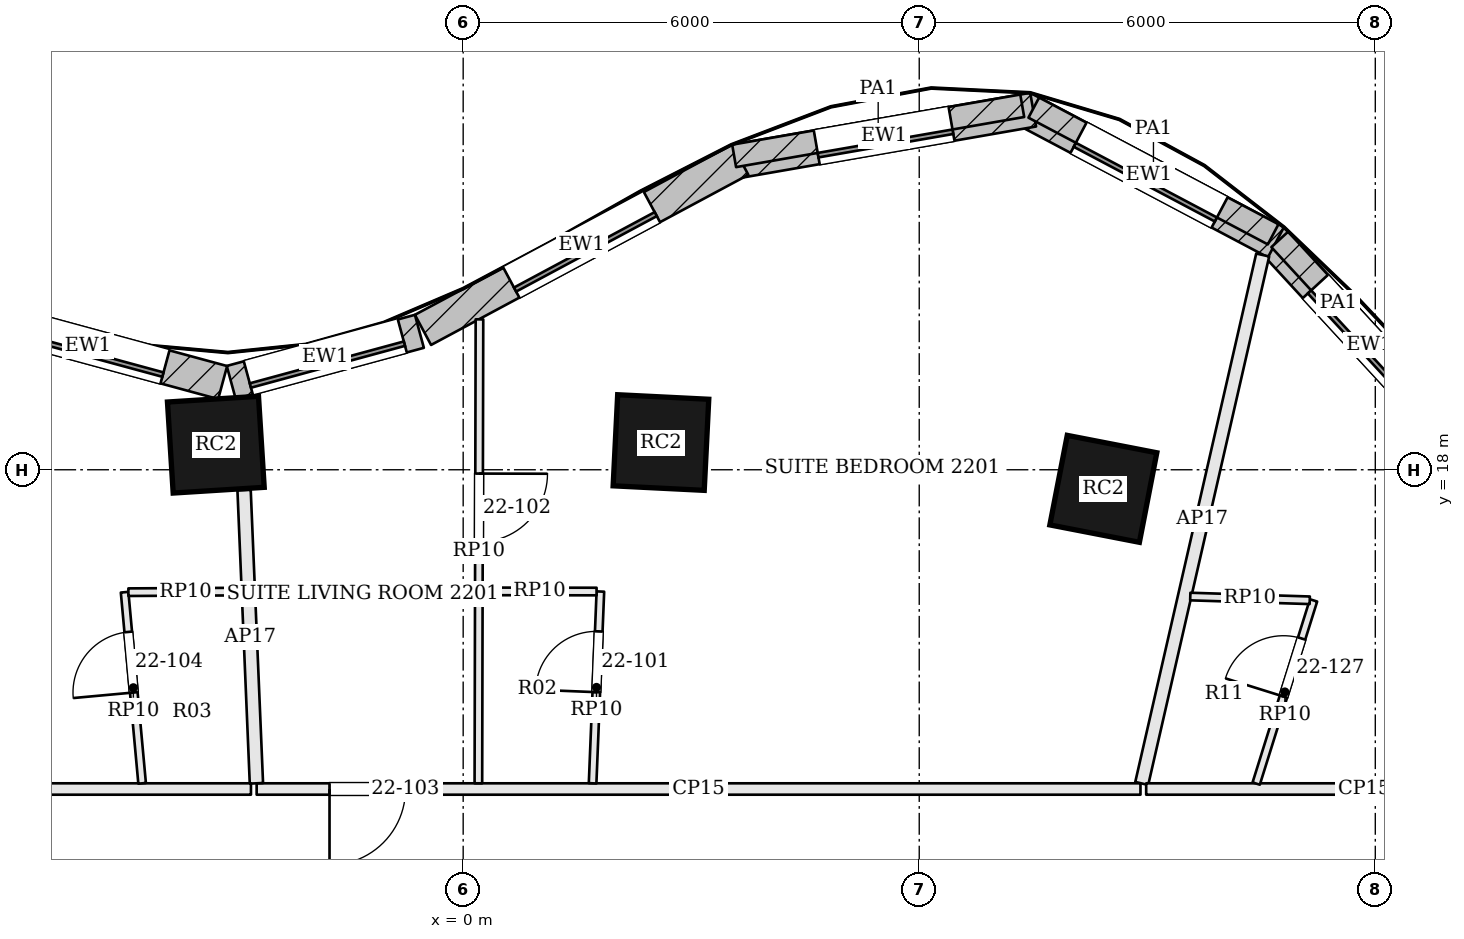
"""IFC4 building model, lengths in metres.
Left out: names, types, materials, properties, quantities, classifications, styles, units other than length and angle.
Written with IfcOpenShell. Run it as: python <this file> out.ifc"""

import sys

from ifc_helpers import new_model, si_unit, direction, frame, frame_2d, origin, origin_2d, place, context, subcontext, project, spatial, rectangle, extrude, element, fill, save


model = new_model("IFC4")
c1 = context("Model", 3, precision=1e-05, world=origin(), true_north=direction((0.0, 1.0)))
c2 = subcontext(c1, "Body", "Model", "MODEL_VIEW")
j1 = project(units=[si_unit("LENGTHUNIT", "METRE"), si_unit("PLANEANGLEUNIT", "RADIAN")], contexts=[c1])
p1 = place(None, origin())
s1 = spatial("IfcSite", under=j1, at=p1, CompositionType="ELEMENT")
p2 = place(p1, origin())
s2 = spatial("IfcBuilding", under=s1, at=p2, CompositionType="ELEMENT")
p3 = place(p2, frame((0.0, 0.0, 96.0)))
s3 = spatial("IfcBuildingStorey", under=s2, at=p3, CompositionType="ELEMENT", Elevation=96.0)
for number, where, z_axis, x_axis in (
    (1, (8.422, 17.749, 0.0), (0.0, 0.0, 1.0), (-0.982, 0.191, 0.0)),
    (2, (2.602, 18.358, 0.0), (0.0, 0.0, 1.0), (-0.999, 0.05, 0.0)),
    (3, (-3.254, 18.33, 0.0), (0.0, 0.0, 1.0), (-0.998, -0.063, 0.0)),
):
    element("IfcColumn", number, at=place(p3, frame(where, z_axis=z_axis, x_axis=x_axis)), inside=s3, PredefinedType="COLUMN", context=c2, shape_type="SweptSolid", body=[
        extrude(rectangle(XDim=1.2, YDim=1.2, at=origin_2d()), origin(), (0.0, 0.0, 1.0), 3.6),
    ])
p4 = place(p3, frame((13.209, 18.243, 0.0), z_axis=(0.0, 0.0, 1.0), x_axis=(-0.677612152497, 0.735419452278, 0.0)))
e4 = element("IfcWall", 4, at=p4, inside=s3, PredefinedType="SOLIDWALL", context=c2, shape_type="SweptSolid", body=[
    extrude(rectangle(XDim=3.797, YDim=0.45, at=frame_2d((1.898, 0.0))), origin(), (0.0, 0.0, 1.0), 3.4),
])
p5 = place(p4, frame((0.848, 0.0, 0.9)))
e5 = element("IfcOpeningElement", 5, at=p5, cuts=e4, PredefinedType="OPENING", context=c2, shape_type="SweptSolid", body=[
    extrude(rectangle(XDim=2.1, YDim=2.0, at=frame_2d((1.05, 1.0))), frame((0.0, 0.235, 0.0), z_axis=(0.0, -1.0, 0.0), x_axis=(1.0, 0.0, 0.0)), (0.0, 0.0, 1.0), 0.47),
])
p6 = place(p3, frame((10.693, 20.993, 0.0), z_axis=(0.0, 0.0, 1.0), x_axis=(-0.883817790726, 0.46783128668, 0.0)))
e6 = element("IfcWall", 6, at=p6, inside=s3, PredefinedType="SOLIDWALL", context=c2, shape_type="SweptSolid", body=[
    extrude(rectangle(XDim=3.777, YDim=0.45, at=frame_2d((1.888, 0.0))), origin(), (0.0, 0.0, 1.0), 3.4),
])
p7 = place(p6, frame((0.838, 0.0, 0.9)))
e7 = element("IfcOpeningElement", 7, at=p7, cuts=e6, PredefinedType="OPENING", context=c2, shape_type="SweptSolid", body=[
    extrude(rectangle(XDim=2.1, YDim=2.0, at=frame_2d((1.05, 1.0))), frame((0.0, 0.235, 0.0), z_axis=(0.0, -1.0, 0.0), x_axis=(1.0, 0.0, 0.0)), (0.0, 0.0, 1.0), 0.47),
])
p8 = place(p3, frame((7.499, 22.737, 0.0), z_axis=(0.0, 0.0, 1.0), x_axis=(-0.98521220506, -0.171338585849, 0.0)))
e8 = element("IfcWall", 8, at=p8, inside=s3, PredefinedType="SOLIDWALL", context=c2, shape_type="SweptSolid", body=[
    extrude(rectangle(XDim=3.98, YDim=0.45, at=frame_2d((1.99, 0.0))), origin(), (0.0, 0.0, 1.0), 3.4),
])
p9 = place(p8, frame((1.09, 0.0, 0.9)))
e9 = element("IfcOpeningElement", 9, at=p9, cuts=e8, PredefinedType="OPENING", context=c2, shape_type="SweptSolid", body=[
    extrude(rectangle(XDim=1.8, YDim=2.0, at=frame_2d((0.9, 1.0))), frame((0.0, 0.235, 0.0), z_axis=(0.0, -1.0, 0.0), x_axis=(1.0, 0.0, 0.0)), (0.0, 0.0, 1.0), 0.47),
])
p10 = place(p3, frame((3.646, 22.079, 0.0), z_axis=(0.0, 0.0, 1.0), x_axis=(-0.881279133897, -0.472596115259, 0.0)))
e10 = element("IfcWall", 10, at=p10, inside=s3, PredefinedType="SOLIDWALL", context=c2, shape_type="SweptSolid", body=[
    extrude(rectangle(XDim=4.737, YDim=0.45, at=frame_2d((2.368, 0.0))), origin(), (0.0, 0.0, 1.0), 3.4),
])
p11 = place(p10, frame((1.318, 0.0, 0.9)))
e11 = element("IfcOpeningElement", 11, at=p11, cuts=e10, PredefinedType="OPENING", context=c2, shape_type="SweptSolid", body=[
    extrude(rectangle(XDim=2.1, YDim=2.0, at=frame_2d((1.05, 1.0))), frame((0.0, 0.235, 0.0), z_axis=(0.0, -1.0, 0.0), x_axis=(1.0, 0.0, 0.0)), (0.0, 0.0, 1.0), 0.47),
])
p12 = place(p3, frame((-0.576, 19.821, 0.0), z_axis=(0.0, 0.0, 1.0), x_axis=(-0.965009398019, -0.262215296532, 0.0)))
e12 = element("IfcWall", 12, at=p12, inside=s3, PredefinedType="SOLIDWALL", context=c2, shape_type="SweptSolid", body=[
    extrude(rectangle(XDim=2.565, YDim=0.45, at=frame_2d((1.283, 0.0))), origin(), (0.0, 0.0, 1.0), 3.4),
])
p13 = place(p12, frame((0.233, 0.0, 0.9)))
e13 = element("IfcOpeningElement", 13, at=p13, cuts=e12, PredefinedType="OPENING", context=c2, shape_type="SweptSolid", body=[
    extrude(rectangle(XDim=2.1, YDim=2.0, at=frame_2d((1.05, 1.0))), frame((0.0, 0.235, 0.0), z_axis=(0.0, -1.0, 0.0), x_axis=(1.0, 0.0, 0.0)), (0.0, 0.0, 1.0), 0.47),
])
p14 = place(p3, frame((-3.164, 19.147, 0.0), z_axis=(0.0, 0.0, 1.0), x_axis=(-0.965039479998, 0.262104563191, 0.0)))
e14 = element("IfcWall", 14, at=p14, inside=s3, PredefinedType="SOLIDWALL", context=c2, shape_type="SweptSolid", body=[
    extrude(rectangle(XDim=3.672, YDim=0.45, at=frame_2d((1.836, 0.0))), origin(), (0.0, 0.0, 1.0), 3.4),
])
p15 = place(p14, frame((0.786, 0.0, 0.9)))
e15 = element("IfcOpeningElement", 15, at=p15, cuts=e14, PredefinedType="OPENING", context=c2, shape_type="SweptSolid", body=[
    extrude(rectangle(XDim=2.1, YDim=2.0, at=frame_2d((1.05, 1.0))), frame((0.0, 0.235, 0.0), z_axis=(0.0, -1.0, 0.0), x_axis=(1.0, 0.0, 0.0)), (0.0, 0.0, 1.0), 0.47),
])
p16 = place(p3, frame((12.288, 19.354, 3.6), z_axis=(0.0, 0.0, 1.0), x_axis=(-0.677603807485, 0.735427141246, 0.0)))
e16 = element("IfcWall", 16, at=p16, inside=s3, PredefinedType="PARAPET", context=c2, shape_type="SweptSolid", body=[
    extrude(rectangle(XDim=2.28, YDim=0.3, at=frame_2d((1.14, 0.0))), origin(), (0.0, 0.0, 1.0), 1.1),
])
p17 = place(p3, frame((10.656, 21.097, 3.6), z_axis=(0.0, 0.0, 1.0), x_axis=(-0.883797916666, 0.467868830439, 0.0)))
e17 = element("IfcWall", 17, at=p17, inside=s3, PredefinedType="PARAPET", context=c2, shape_type="SweptSolid", body=[
    extrude(rectangle(XDim=3.563, YDim=0.3, at=frame_2d((1.781, 0.0))), origin(), (0.0, 0.0, 1.0), 1.1),
])
p18 = place(p3, frame((7.355, 22.789, 3.6), z_axis=(0.0, 0.0, 1.0), x_axis=(-0.985201040548, -0.171402770404, 0.0)))
e18 = element("IfcWall", 18, at=p18, inside=s3, PredefinedType="PARAPET", context=c2, shape_type="SweptSolid", body=[
    extrude(rectangle(XDim=3.847, YDim=0.3, at=frame_2d((1.924, 0.0))), origin(), (0.0, 0.0, 1.0), 1.1),
])
p19 = place(p3, frame((8.911, 13.8, 0.0), z_axis=(0.0, 0.0, 1.0), x_axis=(-1.0, 0.0, 0.0)))
e19 = element("IfcWall", 19, at=p19, inside=s3, PredefinedType="PARTITIONING", context=c2, shape_type="SweptSolid", body=[
    extrude(rectangle(XDim=11.628, YDim=0.15, at=frame_2d((5.814, 0.0))), origin(), (0.0, 0.0, 1.0), 2.784),
])
p20 = place(p19, frame((9.669, 0.0, 0.0)))
e20 = element("IfcOpeningElement", 20, at=p20, cuts=e19, PredefinedType="OPENING", context=c2, shape_type="SweptSolid", body=[
    extrude(rectangle(XDim=1.0, YDim=2.1, at=frame_2d((0.5, 1.05))), frame((0.0, 0.085, 0.0), z_axis=(0.0, -1.0, 0.0), x_axis=(1.0, 0.0, 0.0)), (0.0, 0.0, 1.0), 0.17),
])
p21 = place(p3, frame((10.519, 20.825, 0.0), z_axis=(0.0, 0.0, 1.0), x_axis=(-0.223124088509, -0.974790049768, 0.0)))
e21 = element("IfcWall", 21, at=p21, inside=s3, PredefinedType="PARTITIONING", context=c2, shape_type="SweptSolid", body=[
    extrude(rectangle(XDim=7.132, YDim=0.175, at=frame_2d((3.566, 0.0))), origin(), (0.0, 0.0, 1.0), 2.784),
])
p22 = place(p3, frame((-2.882, 17.732, 0.0), z_axis=(0.0, 0.0, 1.0), x_axis=(0.04199090748, -0.999117992876, 0.0)))
e22 = element("IfcWall", 22, at=p22, inside=s3, PredefinedType="PARTITIONING", context=c2, shape_type="SweptSolid", body=[
    extrude(rectangle(XDim=3.861, YDim=0.175, at=frame_2d((1.93, 0.0))), origin(), (0.0, 0.0, 1.0), 2.784),
])
p23 = place(p3, frame((-2.792, 13.8, 0.0), z_axis=(0.0, 0.0, 1.0), x_axis=(-1.0, 0.0, 0.0)))
e23 = element("IfcWall", 23, at=p23, inside=s3, PredefinedType="PARTITIONING", context=c2, shape_type="SweptSolid", body=[
    extrude(rectangle(XDim=12.008, YDim=0.15, at=frame_2d((6.004, 0.0))), origin(), (0.0, 0.0, 1.0), 2.784),
])
p24 = place(p23, frame((6.771, 0.0, 0.0)))
e24 = element("IfcOpeningElement", 24, at=p24, cuts=e23, PredefinedType="OPENING", context=c2, shape_type="SweptSolid", body=[
    extrude(rectangle(XDim=0.9, YDim=2.4, at=frame_2d((0.45, 1.2))), frame((0.0, 0.085, 0.0), z_axis=(0.0, -1.0, 0.0), x_axis=(1.0, 0.0, 0.0)), (0.0, 0.0, 1.0), 0.17),
])
p25 = place(p3, frame((14.725, 13.8, 0.0), z_axis=(0.0, 0.0, 1.0), x_axis=(-1.0, 0.0, 0.0)))
e25 = element("IfcWall", 25, at=p25, inside=s3, PredefinedType="PARTITIONING", context=c2, shape_type="SweptSolid", body=[
    extrude(rectangle(XDim=5.74, YDim=0.15, at=frame_2d((2.87, 0.0))), origin(), (0.0, 0.0, 1.0), 2.784),
])
p26 = place(p3, frame((0.214, 19.979, 0.0), z_axis=(0.0, 0.0, 1.0), x_axis=(-0.002359899032, -0.999997215434, 0.0)))
e26 = element("IfcWall", 26, at=p26, inside=s3, PredefinedType="PARTITIONING", context=c2, shape_type="SweptSolid", body=[
    extrude(rectangle(XDim=6.104, YDim=0.1, at=frame_2d((3.052, 0.0))), origin(), (0.0, 0.0, 1.0), 2.884),
])
p27 = place(p26, frame((2.029, 0.0, 0.0)))
e27 = element("IfcOpeningElement", 27, at=p27, cuts=e26, PredefinedType="OPENING", context=c2, shape_type="SweptSolid", body=[
    extrude(rectangle(XDim=0.9, YDim=2.4, at=frame_2d((0.45, 1.2))), frame((0.0, 0.06, 0.0), z_axis=(0.0, -1.0, 0.0), x_axis=(1.0, 0.0, 0.0)), (0.0, 0.0, 1.0), 0.12),
])
p28 = place(p3, frame((1.703, 13.875, 0.0), z_axis=(0.0, 0.0, 1.0), x_axis=(0.040512484472, 0.999179032307, 0.0)))
e28 = element("IfcWall", 28, at=p28, inside=s3, PredefinedType="PARTITIONING", context=c2, shape_type="SweptSolid", body=[
    extrude(rectangle(XDim=2.525, YDim=0.1, at=frame_2d((1.262, 0.0))), origin(), (0.0, 0.0, 1.0), 2.884),
])
p29 = place(p28, frame((1.2, 0.0, 0.0)))
e29 = element("IfcOpeningElement", 29, at=p29, cuts=e28, PredefinedType="OPENING", context=c2, shape_type="SweptSolid", body=[
    extrude(rectangle(XDim=0.8, YDim=2.1, at=frame_2d((0.4, 1.05))), frame((0.0, 0.06, 0.0), z_axis=(0.0, -1.0, 0.0), x_axis=(1.0, 0.0, 0.0)), (0.0, 0.0, 1.0), 0.12),
])
p30 = place(p3, frame((1.755, 16.398, 0.0), z_axis=(0.0, 0.0, 1.0), x_axis=(-0.999999151462, 0.001302718321, 0.0)))
e30 = element("IfcWall", 30, at=p30, inside=s3, PredefinedType="PARTITIONING", context=c2, shape_type="SweptSolid", body=[
    extrude(rectangle(XDim=1.499, YDim=0.1, at=frame_2d((0.75, 0.0))), origin(), (0.0, 0.0, 1.0), 2.884),
])
p31 = place(p3, frame((-4.224, 13.875, 0.0), z_axis=(0.0, 0.0, 1.0), x_axis=(-0.09127675815, 0.995825563752, 0.0)))
e31 = element("IfcWall", 31, at=p31, inside=s3, PredefinedType="PARTITIONING", context=c2, shape_type="SweptSolid", body=[
    extrude(rectangle(XDim=2.525, YDim=0.1, at=frame_2d((1.262, 0.0))), origin(), (0.0, 0.0, 1.0), 2.884),
])
p32 = place(p31, frame((1.2, 0.0, 0.0)))
e32 = element("IfcOpeningElement", 32, at=p32, cuts=e31, PredefinedType="OPENING", context=c2, shape_type="SweptSolid", body=[
    extrude(rectangle(XDim=0.8, YDim=2.1, at=frame_2d((0.4, 1.05))), frame((0.0, 0.06, 0.0), z_axis=(0.0, -1.0, 0.0), x_axis=(1.0, 0.0, 0.0)), (0.0, 0.0, 1.0), 0.12),
])
p33 = place(p3, frame((-4.404, 16.389, 0.0), z_axis=(0.0, 0.0, 1.0), x_axis=(0.999986489733, 0.005198110408, 0.0)))
e33 = element("IfcWall", 33, at=p33, inside=s3, PredefinedType="PARTITIONING", context=c2, shape_type="SweptSolid", body=[
    extrude(rectangle(XDim=1.503, YDim=0.1, at=frame_2d((0.751, 0.0))), origin(), (0.0, 0.0, 1.0), 2.884),
])
p34 = place(p3, frame((10.433, 13.872, 0.0), z_axis=(0.0, 0.0, 1.0), x_axis=(0.298770443437, 0.954325008647, 0.0)))
e34 = element("IfcWall", 34, at=p34, inside=s3, PredefinedType="PARTITIONING", context=c2, shape_type="SweptSolid", body=[
    extrude(rectangle(XDim=2.525, YDim=0.1, at=frame_2d((1.262, 0.0))), origin(), (0.0, 0.0, 1.0), 2.884),
])
p35 = place(p34, frame((1.2, 0.0, 0.0)))
e35 = element("IfcOpeningElement", 35, at=p35, cuts=e34, PredefinedType="OPENING", context=c2, shape_type="SweptSolid", body=[
    extrude(rectangle(XDim=0.8, YDim=2.1, at=frame_2d((0.4, 1.05))), frame((0.0, 0.06, 0.0), z_axis=(0.0, -1.0, 0.0), x_axis=(1.0, 0.0, 0.0)), (0.0, 0.0, 1.0), 0.12),
])
p36 = place(p3, frame((11.138, 16.283, 0.0), z_axis=(0.0, 0.0, 1.0), x_axis=(-0.99950813006, 0.031360770779, 0.0)))
e36 = element("IfcWall", 36, at=p36, inside=s3, PredefinedType="PARTITIONING", context=c2, shape_type="SweptSolid", body=[
    extrude(rectangle(XDim=1.573, YDim=0.1, at=frame_2d((0.786, 0.0))), origin(), (0.0, 0.0, 1.0), 2.884),
])
p37 = place(p5, origin())
e37 = element("IfcWindow", 37, at=p37, inside=s3, PartitioningType="SINGLE_PANEL", PredefinedType="WINDOW", context=c2, shape_type="SweptSolid", body=[
    extrude(rectangle(XDim=2.1, YDim=2.0, at=frame_2d((1.05, 1.0))), frame((0.0, 0.135, 0.0), z_axis=(0.0, -1.0, 0.0), x_axis=(1.0, 0.0, 0.0)), (0.0, 0.0, 1.0), 0.06),
])
fill(e5, e37)
p38 = place(p7, origin())
e38 = element("IfcWindow", 38, at=p38, inside=s3, PartitioningType="SINGLE_PANEL", PredefinedType="WINDOW", context=c2, shape_type="SweptSolid", body=[
    extrude(rectangle(XDim=2.1, YDim=2.0, at=frame_2d((1.05, 1.0))), frame((0.0, 0.135, 0.0), z_axis=(0.0, -1.0, 0.0), x_axis=(1.0, 0.0, 0.0)), (0.0, 0.0, 1.0), 0.06),
])
fill(e7, e38)
p39 = place(p9, origin())
e39 = element("IfcWindow", 39, at=p39, inside=s3, PartitioningType="SINGLE_PANEL", PredefinedType="WINDOW", context=c2, shape_type="SweptSolid", body=[
    extrude(rectangle(XDim=1.8, YDim=2.0, at=frame_2d((0.9, 1.0))), frame((0.0, 0.135, 0.0), z_axis=(0.0, -1.0, 0.0), x_axis=(1.0, 0.0, 0.0)), (0.0, 0.0, 1.0), 0.06),
])
fill(e9, e39)
p40 = place(p11, origin())
e40 = element("IfcWindow", 40, at=p40, inside=s3, PartitioningType="SINGLE_PANEL", PredefinedType="WINDOW", context=c2, shape_type="SweptSolid", body=[
    extrude(rectangle(XDim=2.1, YDim=2.0, at=frame_2d((1.05, 1.0))), frame((0.0, 0.135, 0.0), z_axis=(0.0, -1.0, 0.0), x_axis=(1.0, 0.0, 0.0)), (0.0, 0.0, 1.0), 0.06),
])
fill(e11, e40)
p41 = place(p13, origin())
e41 = element("IfcWindow", 41, at=p41, inside=s3, PartitioningType="SINGLE_PANEL", PredefinedType="WINDOW", context=c2, shape_type="SweptSolid", body=[
    extrude(rectangle(XDim=2.1, YDim=2.0, at=frame_2d((1.05, 1.0))), frame((0.0, 0.135, 0.0), z_axis=(0.0, -1.0, 0.0), x_axis=(1.0, 0.0, 0.0)), (0.0, 0.0, 1.0), 0.06),
])
fill(e13, e41)
p42 = place(p15, origin())
e42 = element("IfcWindow", 42, at=p42, inside=s3, PartitioningType="SINGLE_PANEL", PredefinedType="WINDOW", context=c2, shape_type="SweptSolid", body=[
    extrude(rectangle(XDim=2.1, YDim=2.0, at=frame_2d((1.05, 1.0))), frame((0.0, 0.135, 0.0), z_axis=(0.0, -1.0, 0.0), x_axis=(1.0, 0.0, 0.0)), (0.0, 0.0, 1.0), 0.06),
])
fill(e15, e42)
p43 = place(p29, origin())
e43 = element("IfcDoor", 43, at=p43, inside=s3, OperationType="SINGLE_SWING_LEFT", PredefinedType="DOOR", context=c2, shape_type="SweptSolid", body=[
    extrude(rectangle(XDim=0.8, YDim=2.1, at=frame_2d((0.4, 1.05))), frame((0.0, 0.025, 0.0), z_axis=(0.0, -1.0, 0.0), x_axis=(1.0, 0.0, 0.0)), (0.0, 0.0, 1.0), 0.05),
])
fill(e29, e43)
p44 = place(p27, origin())
e44 = element("IfcDoor", 44, at=p44, inside=s3, OperationType="SINGLE_SWING_LEFT", PredefinedType="DOOR", context=c2, shape_type="SweptSolid", body=[
    extrude(rectangle(XDim=0.9, YDim=2.4, at=frame_2d((0.45, 1.2))), frame((0.0, 0.025, 0.0), z_axis=(0.0, -1.0, 0.0), x_axis=(1.0, 0.0, 0.0)), (0.0, 0.0, 1.0), 0.05),
])
fill(e27, e44)
p45 = place(p20, origin())
e45 = element("IfcDoor", 45, at=p45, inside=s3, OperationType="SINGLE_SWING_RIGHT", PredefinedType="DOOR", context=c2, shape_type="SweptSolid", body=[
    extrude(rectangle(XDim=1.0, YDim=2.1, at=frame_2d((0.5, 1.05))), frame((0.0, 0.025, 0.0), z_axis=(0.0, -1.0, 0.0), x_axis=(1.0, 0.0, 0.0)), (0.0, 0.0, 1.0), 0.05),
])
fill(e20, e45)
p46 = place(p32, origin())
e46 = element("IfcDoor", 46, at=p46, inside=s3, OperationType="SINGLE_SWING_LEFT", PredefinedType="DOOR", context=c2, shape_type="SweptSolid", body=[
    extrude(rectangle(XDim=0.8, YDim=2.1, at=frame_2d((0.4, 1.05))), frame((0.0, 0.025, 0.0), z_axis=(0.0, -1.0, 0.0), x_axis=(1.0, 0.0, 0.0)), (0.0, 0.0, 1.0), 0.05),
])
fill(e32, e46)
p47 = place(p35, origin())
e47 = element("IfcDoor", 47, at=p47, inside=s3, OperationType="SINGLE_SWING_LEFT", PredefinedType="DOOR", context=c2, shape_type="SweptSolid", body=[
    extrude(rectangle(XDim=0.8, YDim=2.1, at=frame_2d((0.4, 1.05))), frame((0.0, 0.025, 0.0), z_axis=(0.0, -1.0, 0.0), x_axis=(1.0, 0.0, 0.0)), (0.0, 0.0, 1.0), 0.05),
])
fill(e35, e47)
save(model, sys.argv[1])
